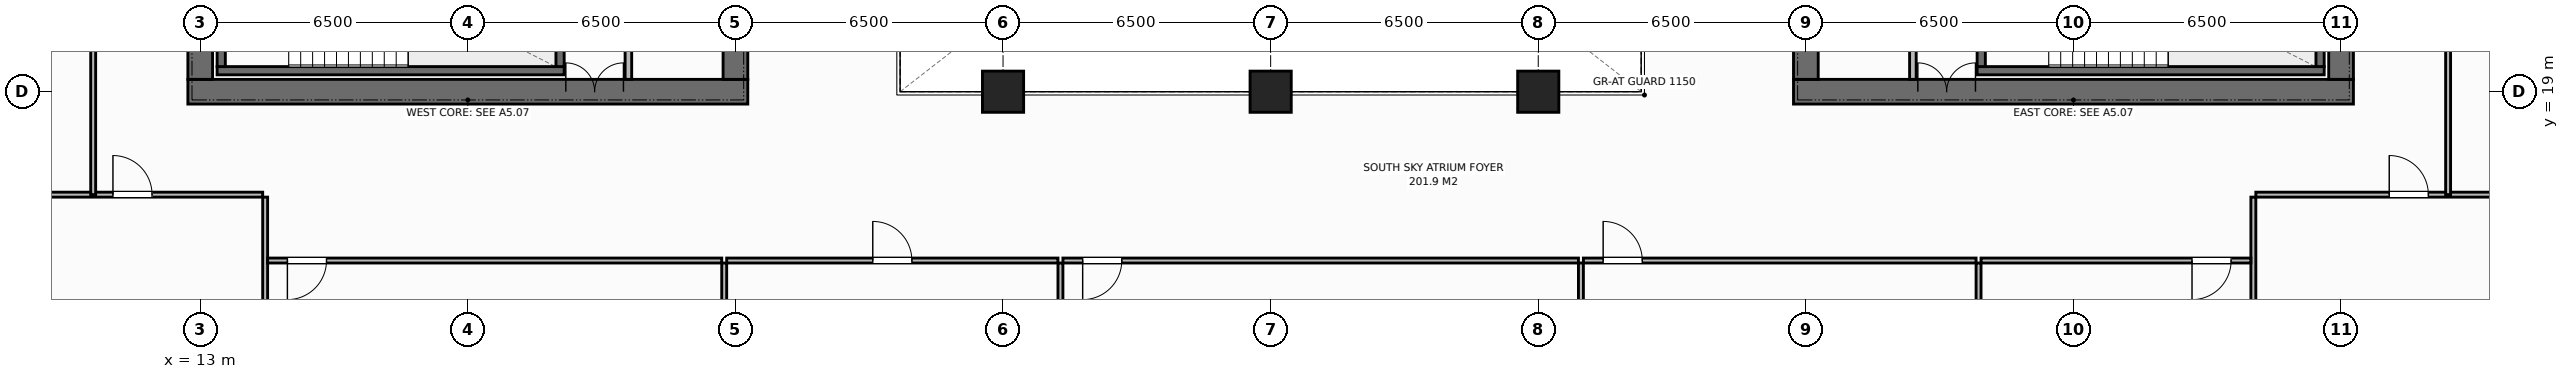
"""IFC4 building model, lengths in metres.
Left out: names, types, materials, properties, quantities, classifications, styles, units other than length and angle.
Written with IfcOpenShell. Run it as: python <this file> out.ifc"""

import sys

from ifc_helpers import new_model, si_unit, direction, frame, frame_2d, origin, origin_2d, place, context, subcontext, project, spatial, rectangle, extrude, element, fill, save


model = new_model("IFC4")
c1 = context("Model", 3, precision=1e-05, world=origin(), true_north=direction((0.0, 1.0)))
c2 = subcontext(c1, "Body", "Model", "MODEL_VIEW")
j1 = project(units=[si_unit("LENGTHUNIT", "METRE"), si_unit("PLANEANGLEUNIT", "RADIAN")], contexts=[c1])
p1 = place(None, origin())
s1 = spatial("IfcSite", under=j1, at=p1, CompositionType="ELEMENT")
p2 = place(p1, origin())
s2 = spatial("IfcBuilding", under=s1, at=p2, CompositionType="ELEMENT")
p3 = place(p2, frame((0.0, 0.0, 186.0)))
s3 = spatial("IfcBuildingStorey", under=s2, at=p3, CompositionType="ELEMENT", Elevation=186.0)
p4 = place(p3, frame((12.7, 19.0, 0.0), z_axis=(0.0, 0.0, 1.0), x_axis=(1.0, 0.0, 0.0)))
e1 = element("IfcWall", 1, at=p4, inside=s3, PredefinedType="SHEAR", context=c2, shape_type="SweptSolid", body=[
    extrude(rectangle(XDim=13.6, YDim=0.6, at=frame_2d((6.8, 0.0))), origin(), (0.0, 0.0, 1.0), 3.8),
])
p5 = place(p4, frame((9.18, 0.0, 0.0)))
e2 = element("IfcOpeningElement", 2, at=p5, cuts=e1, PredefinedType="OPENING", context=c2, shape_type="SweptSolid", body=[
    extrude(rectangle(XDim=1.4, YDim=2.2, at=frame_2d((0.7, 1.1))), frame((0.0, 0.31, 0.0), z_axis=(0.0, -1.0, 0.0), x_axis=(1.0, 0.0, 0.0)), (0.0, 0.0, 1.0), 0.62),
])
p6 = place(p3, frame((13.0, 19.3, 0.0), z_axis=(0.0, 0.0, 1.0), x_axis=(0.0, 1.0, 0.0)))
e3 = element("IfcWall", 3, at=p6, inside=s3, PredefinedType="SHEAR", context=c2, shape_type="SweptSolid", body=[
    extrude(rectangle(XDim=13.4, YDim=0.6, at=frame_2d((6.7, 0.0))), origin(), (0.0, 0.0, 1.0), 3.8),
])
p7 = place(p6, frame((4.75, 0.0, 0.0)))
e4 = element("IfcOpeningElement", 4, at=p7, cuts=e3, PredefinedType="OPENING", context=c2, shape_type="SweptSolid", body=[
    extrude(rectangle(XDim=1.4, YDim=2.2, at=frame_2d((0.7, 1.1))), frame((0.0, 0.31, 0.0), z_axis=(0.0, -1.0, 0.0), x_axis=(1.0, 0.0, 0.0)), (0.0, 0.0, 1.0), 0.62),
])
p8 = place(p3, frame((26.0, 19.3, 0.0), z_axis=(0.0, 0.0, 1.0), x_axis=(0.0, 1.0, 0.0)))
e5 = element("IfcWall", 5, at=p8, inside=s3, PredefinedType="SHEAR", context=c2, shape_type="SweptSolid", body=[
    extrude(rectangle(XDim=13.4, YDim=0.6, at=frame_2d((6.7, 0.0))), origin(), (0.0, 0.0, 1.0), 3.8),
])
p9 = place(p3, frame((51.7, 19.0, 0.0), z_axis=(0.0, 0.0, 1.0), x_axis=(1.0, 0.0, 0.0)))
e6 = element("IfcWall", 6, at=p9, inside=s3, PredefinedType="SHEAR", context=c2, shape_type="SweptSolid", body=[
    extrude(rectangle(XDim=13.6, YDim=0.6, at=frame_2d((6.8, 0.0))), origin(), (0.0, 0.0, 1.0), 3.8),
])
p10 = place(p9, frame((3.02, 0.0, 0.0)))
e7 = element("IfcOpeningElement", 7, at=p10, cuts=e6, PredefinedType="OPENING", context=c2, shape_type="SweptSolid", body=[
    extrude(rectangle(XDim=1.4, YDim=2.2, at=frame_2d((0.7, 1.1))), frame((0.0, 0.31, 0.0), z_axis=(0.0, -1.0, 0.0), x_axis=(1.0, 0.0, 0.0)), (0.0, 0.0, 1.0), 0.62),
])
p11 = place(p3, frame((52.0, 19.3, 0.0), z_axis=(0.0, 0.0, 1.0), x_axis=(0.0, 1.0, 0.0)))
e8 = element("IfcWall", 8, at=p11, inside=s3, PredefinedType="SHEAR", context=c2, shape_type="SweptSolid", body=[
    extrude(rectangle(XDim=13.4, YDim=0.6, at=frame_2d((6.7, 0.0))), origin(), (0.0, 0.0, 1.0), 3.8),
])
p12 = place(p3, frame((65.0, 19.3, 0.0), z_axis=(0.0, 0.0, 1.0), x_axis=(0.0, 1.0, 0.0)))
e9 = element("IfcWall", 9, at=p12, inside=s3, PredefinedType="SHEAR", context=c2, shape_type="SweptSolid", body=[
    extrude(rectangle(XDim=13.4, YDim=0.6, at=frame_2d((6.7, 0.0))), origin(), (0.0, 0.0, 1.0), 3.8),
])
p13 = place(p12, frame((8.15, 0.0, 0.0)))
e10 = element("IfcOpeningElement", 10, at=p13, cuts=e9, PredefinedType="OPENING", context=c2, shape_type="SweptSolid", body=[
    extrude(rectangle(XDim=1.3, YDim=2.2, at=frame_2d((0.65, 1.1))), frame((0.0, 0.31, 0.0), z_axis=(0.0, -1.0, 0.0), x_axis=(1.0, 0.0, 0.0)), (0.0, 0.0, 1.0), 0.62),
])
p14 = place(p3, frame((13.41, 19.51, 0.0), z_axis=(0.0, 0.0, 1.0), x_axis=(1.0, 0.0, 0.0)))
e11 = element("IfcWall", 11, at=p14, inside=s3, PredefinedType="SHEAR", context=c2, shape_type="SweptSolid", body=[
    extrude(rectangle(XDim=8.43, YDim=0.2, at=frame_2d((4.215, 0.0))), origin(), (0.0, 0.0, 1.0), 3.8),
])
for number, where, z_axis, x_axis in (
    (12, (13.51, 19.61, 0.0), (0.0, 0.0, 1.0), (0.0, 1.0, 0.0)),
    (13, (21.74, 19.61, 0.0), (0.0, 0.0, 1.0), (0.0, 1.0, 0.0)),
):
    element("IfcWall", number, at=place(p3, frame(where, z_axis=z_axis, x_axis=x_axis)), inside=s3, PredefinedType="SHEAR", context=c2, shape_type="SweptSolid", body=[
        extrude(rectangle(XDim=3.28, YDim=0.2, at=frame_2d((1.64, 0.0))), origin(), (0.0, 0.0, 1.0), 3.8),
    ])
p15 = place(p3, frame((56.16, 19.51, 0.0), z_axis=(0.0, 0.0, 1.0), x_axis=(1.0, 0.0, 0.0)))
e14 = element("IfcWall", 14, at=p15, inside=s3, PredefinedType="SHEAR", context=c2, shape_type="SweptSolid", body=[
    extrude(rectangle(XDim=8.43, YDim=0.2, at=frame_2d((4.215, 0.0))), origin(), (0.0, 0.0, 1.0), 3.8),
])
for number, where, z_axis, x_axis in (
    (15, (56.26, 19.61, 0.0), (0.0, 0.0, 1.0), (0.0, 1.0, 0.0)),
    (16, (64.49, 19.61, 0.0), (0.0, 0.0, 1.0), (0.0, 1.0, 0.0)),
):
    element("IfcWall", number, at=place(p3, frame(where, z_axis=z_axis, x_axis=x_axis)), inside=s3, PredefinedType="SHEAR", context=c2, shape_type="SweptSolid", body=[
        extrude(rectangle(XDim=3.28, YDim=0.2, at=frame_2d((1.64, 0.0))), origin(), (0.0, 0.0, 1.0), 3.8),
    ])
for number, where, z_axis, x_axis in (
    (17, (32.5, 19.0, 0.0), (0.0, 0.0, 1.0), (1.0, 0.0, 0.0)),
    (18, (39.0, 19.0, 0.0), (0.0, 0.0, 1.0), (1.0, 0.0, 0.0)),
    (19, (45.5, 19.0, 0.0), (0.0, 0.0, 1.0), (1.0, 0.0, 0.0)),
):
    element("IfcColumn", number, at=place(p3, frame(where, z_axis=z_axis, x_axis=x_axis)), inside=s3, PredefinedType="COLUMN", context=c2, shape_type="SweptSolid", body=[
        extrude(rectangle(XDim=1.0, YDim=1.0, at=origin_2d()), origin(), (0.0, 0.0, 1.0), 3.8),
    ])
p16 = place(p3, frame((23.4, 19.3, 0.0), z_axis=(0.0, 0.0, 1.0), x_axis=(0.0, 1.0, 0.0)))
e20 = element("IfcWall", 20, at=p16, inside=s3, PredefinedType="STANDARD", context=c2, shape_type="SweptSolid", body=[
    extrude(rectangle(XDim=13.4, YDim=0.16, at=frame_2d((6.7, 0.0))), origin(), (0.0, 0.0, 1.0), 3.572),
])
p17 = place(p16, frame((2.2, 0.0, 0.0)))
e21 = element("IfcOpeningElement", 21, at=p17, cuts=e20, PredefinedType="OPENING", context=c2, shape_type="SweptSolid", body=[
    extrude(rectangle(XDim=0.95, YDim=2.15, at=frame_2d((0.475, 1.075))), frame((0.0, 0.09, 0.0), z_axis=(0.0, -1.0, 0.0), x_axis=(1.0, 0.0, 0.0)), (0.0, 0.0, 1.0), 0.18),
])
p18 = place(p16, frame((6.3, 0.0, 0.0)))
e22 = element("IfcOpeningElement", 22, at=p18, cuts=e20, PredefinedType="OPENING", context=c2, shape_type="SweptSolid", body=[
    extrude(rectangle(XDim=0.95, YDim=2.15, at=frame_2d((0.475, 1.075))), frame((0.0, 0.09, 0.0), z_axis=(0.0, -1.0, 0.0), x_axis=(1.0, 0.0, 0.0)), (0.0, 0.0, 1.0), 0.18),
])
p19 = place(p16, frame((9.3, 0.0, 0.0)))
e23 = element("IfcOpeningElement", 23, at=p19, cuts=e20, PredefinedType="OPENING", context=c2, shape_type="SweptSolid", body=[
    extrude(rectangle(XDim=1.1, YDim=2.2, at=frame_2d((0.55, 1.1))), frame((0.0, 0.09, 0.0), z_axis=(0.0, -1.0, 0.0), x_axis=(1.0, 0.0, 0.0)), (0.0, 0.0, 1.0), 0.18),
])
p20 = place(p16, frame((11.5, 0.0, 0.0)))
e24 = element("IfcOpeningElement", 24, at=p20, cuts=e20, PredefinedType="OPENING", context=c2, shape_type="SweptSolid", body=[
    extrude(rectangle(XDim=1.1, YDim=2.2, at=frame_2d((0.55, 1.1))), frame((0.0, 0.09, 0.0), z_axis=(0.0, -1.0, 0.0), x_axis=(1.0, 0.0, 0.0)), (0.0, 0.0, 1.0), 0.18),
])
p21 = place(p3, frame((54.6, 19.3, 0.0), z_axis=(0.0, 0.0, 1.0), x_axis=(0.0, 1.0, 0.0)))
e25 = element("IfcWall", 25, at=p21, inside=s3, PredefinedType="STANDARD", context=c2, shape_type="SweptSolid", body=[
    extrude(rectangle(XDim=13.4, YDim=0.16, at=frame_2d((6.7, 0.0))), origin(), (0.0, 0.0, 1.0), 3.572),
])
p22 = place(p21, frame((2.1, 0.0, 0.0)))
e26 = element("IfcOpeningElement", 26, at=p22, cuts=e25, PredefinedType="OPENING", context=c2, shape_type="SweptSolid", body=[
    extrude(rectangle(XDim=0.95, YDim=2.15, at=frame_2d((0.475, 1.075))), frame((0.0, 0.09, 0.0), z_axis=(0.0, -1.0, 0.0), x_axis=(1.0, 0.0, 0.0)), (0.0, 0.0, 1.0), 0.18),
])
p23 = place(p21, frame((6.2, 0.0, 0.0)))
e27 = element("IfcOpeningElement", 27, at=p23, cuts=e25, PredefinedType="OPENING", context=c2, shape_type="SweptSolid", body=[
    extrude(rectangle(XDim=0.95, YDim=2.15, at=frame_2d((0.475, 1.075))), frame((0.0, 0.09, 0.0), z_axis=(0.0, -1.0, 0.0), x_axis=(1.0, 0.0, 0.0)), (0.0, 0.0, 1.0), 0.18),
])
p24 = place(p21, frame((9.3, 0.0, 0.0)))
e28 = element("IfcOpeningElement", 28, at=p24, cuts=e25, PredefinedType="OPENING", context=c2, shape_type="SweptSolid", body=[
    extrude(rectangle(XDim=1.1, YDim=2.2, at=frame_2d((0.55, 1.1))), frame((0.0, 0.09, 0.0), z_axis=(0.0, -1.0, 0.0), x_axis=(1.0, 0.0, 0.0)), (0.0, 0.0, 1.0), 0.18),
])
p25 = place(p21, frame((11.5, 0.0, 0.0)))
e29 = element("IfcOpeningElement", 29, at=p25, cuts=e25, PredefinedType="OPENING", context=c2, shape_type="SweptSolid", body=[
    extrude(rectangle(XDim=1.1, YDim=2.2, at=frame_2d((0.55, 1.1))), frame((0.0, 0.09, 0.0), z_axis=(0.0, -1.0, 0.0), x_axis=(1.0, 0.0, 0.0)), (0.0, 0.0, 1.0), 0.18),
])
p26 = place(p3, frame((14.577, 3.42, 0.0), z_axis=(0.0, 0.0, 1.0), x_axis=(0.0, 1.0, 0.0)))
e30 = element("IfcWall", 30, at=p26, inside=s3, PredefinedType="PARTITIONING", context=c2, shape_type="SweptSolid", body=[
    extrude(rectangle(XDim=13.02, YDim=0.12, at=frame_2d((6.51, 0.0))), origin(), (0.0, 0.0, 1.0), 3.572),
])
p27 = place(p3, frame((3.98, 16.5, 0.0), z_axis=(0.0, 0.0, 1.0), x_axis=(1.0, 0.0, 0.0)))
e31 = element("IfcWall", 31, at=p27, inside=s3, PredefinedType="PARTITIONING", context=c2, shape_type="SweptSolid", body=[
    extrude(rectangle(XDim=10.537, YDim=0.12, at=frame_2d((5.269, 0.0))), origin(), (0.0, 0.0, 1.0), 3.572),
])
p28 = place(p27, frame((6.9, 0.0, 0.0)))
e32 = element("IfcOpeningElement", 32, at=p28, cuts=e31, PredefinedType="OPENING", context=c2, shape_type="SweptSolid", body=[
    extrude(rectangle(XDim=0.95, YDim=2.15, at=frame_2d((0.475, 1.075))), frame((0.0, 0.07, 0.0), z_axis=(0.0, -1.0, 0.0), x_axis=(1.0, 0.0, 0.0)), (0.0, 0.0, 1.0), 0.14),
])
p29 = place(p3, frame((25.727, 3.42, 0.0), z_axis=(0.0, 0.0, 1.0), x_axis=(0.0, 1.0, 0.0)))
e33 = element("IfcWall", 33, at=p29, inside=s3, PredefinedType="PARTITIONING", context=c2, shape_type="SweptSolid", body=[
    extrude(rectangle(XDim=11.42, YDim=0.12, at=frame_2d((5.71, 0.0))), origin(), (0.0, 0.0, 1.0), 3.572),
])
p30 = place(p3, frame((14.637, 14.9, 0.0), z_axis=(0.0, 0.0, 1.0), x_axis=(1.0, 0.0, 0.0)))
e34 = element("IfcWall", 34, at=p30, inside=s3, PredefinedType="PARTITIONING", context=c2, shape_type="SweptSolid", body=[
    extrude(rectangle(XDim=11.03, YDim=0.12, at=frame_2d((5.515, 0.0))), origin(), (0.0, 0.0, 1.0), 3.572),
])
p31 = place(p30, frame((0.48, 0.0, 0.0)))
e35 = element("IfcOpeningElement", 35, at=p31, cuts=e34, PredefinedType="OPENING", context=c2, shape_type="SweptSolid", body=[
    extrude(rectangle(XDim=0.95, YDim=2.15, at=frame_2d((0.475, 1.075))), frame((0.0, 0.07, 0.0), z_axis=(0.0, -1.0, 0.0), x_axis=(1.0, 0.0, 0.0)), (0.0, 0.0, 1.0), 0.14),
])
p32 = place(p3, frame((33.894, 3.42, 0.0), z_axis=(0.0, 0.0, 1.0), x_axis=(0.0, 1.0, 0.0)))
e36 = element("IfcWall", 36, at=p32, inside=s3, PredefinedType="PARTITIONING", context=c2, shape_type="SweptSolid", body=[
    extrude(rectangle(XDim=11.42, YDim=0.12, at=frame_2d((5.71, 0.0))), origin(), (0.0, 0.0, 1.0), 3.572),
])
p33 = place(p3, frame((25.787, 14.9, 0.0), z_axis=(0.0, 0.0, 1.0), x_axis=(1.0, 0.0, 0.0)))
e37 = element("IfcWall", 37, at=p33, inside=s3, PredefinedType="PARTITIONING", context=c2, shape_type="SweptSolid", body=[
    extrude(rectangle(XDim=8.047, YDim=0.12, at=frame_2d((4.023, 0.0))), origin(), (0.0, 0.0, 1.0), 3.572),
])
p34 = place(p33, frame((3.548, 0.0, 0.0)))
e38 = element("IfcOpeningElement", 38, at=p34, cuts=e37, PredefinedType="OPENING", context=c2, shape_type="SweptSolid", body=[
    extrude(rectangle(XDim=0.95, YDim=2.15, at=frame_2d((0.475, 1.075))), frame((0.0, 0.07, 0.0), z_axis=(0.0, -1.0, 0.0), x_axis=(1.0, 0.0, 0.0)), (0.0, 0.0, 1.0), 0.14),
])
p35 = place(p3, frame((46.536, 3.42, 0.0), z_axis=(0.0, 0.0, 1.0), x_axis=(0.0, 1.0, 0.0)))
e39 = element("IfcWall", 39, at=p35, inside=s3, PredefinedType="PARTITIONING", context=c2, shape_type="SweptSolid", body=[
    extrude(rectangle(XDim=11.42, YDim=0.12, at=frame_2d((5.71, 0.0))), origin(), (0.0, 0.0, 1.0), 3.572),
])
p36 = place(p3, frame((33.954, 14.9, 0.0), z_axis=(0.0, 0.0, 1.0), x_axis=(1.0, 0.0, 0.0)))
e40 = element("IfcWall", 40, at=p36, inside=s3, PredefinedType="PARTITIONING", context=c2, shape_type="SweptSolid", body=[
    extrude(rectangle(XDim=12.522, YDim=0.12, at=frame_2d((6.261, 0.0))), origin(), (0.0, 0.0, 1.0), 3.572),
])
p37 = place(p36, frame((0.48, 0.0, 0.0)))
e41 = element("IfcOpeningElement", 41, at=p37, cuts=e40, PredefinedType="OPENING", context=c2, shape_type="SweptSolid", body=[
    extrude(rectangle(XDim=0.95, YDim=2.15, at=frame_2d((0.475, 1.075))), frame((0.0, 0.07, 0.0), z_axis=(0.0, -1.0, 0.0), x_axis=(1.0, 0.0, 0.0)), (0.0, 0.0, 1.0), 0.14),
])
p38 = place(p3, frame((56.195, 3.42, 0.0), z_axis=(0.0, 0.0, 1.0), x_axis=(0.0, 1.0, 0.0)))
e42 = element("IfcWall", 42, at=p38, inside=s3, PredefinedType="PARTITIONING", context=c2, shape_type="SweptSolid", body=[
    extrude(rectangle(XDim=11.42, YDim=0.12, at=frame_2d((5.71, 0.0))), origin(), (0.0, 0.0, 1.0), 3.572),
])
p39 = place(p3, frame((46.596, 14.9, 0.0), z_axis=(0.0, 0.0, 1.0), x_axis=(1.0, 0.0, 0.0)))
e43 = element("IfcWall", 43, at=p39, inside=s3, PredefinedType="PARTITIONING", context=c2, shape_type="SweptSolid", body=[
    extrude(rectangle(XDim=9.539, YDim=0.12, at=frame_2d((4.769, 0.0))), origin(), (0.0, 0.0, 1.0), 3.572),
])
p40 = place(p39, frame((0.48, 0.0, 0.0)))
e44 = element("IfcOpeningElement", 44, at=p40, cuts=e43, PredefinedType="OPENING", context=c2, shape_type="SweptSolid", body=[
    extrude(rectangle(XDim=0.95, YDim=2.15, at=frame_2d((0.475, 1.075))), frame((0.0, 0.07, 0.0), z_axis=(0.0, -1.0, 0.0), x_axis=(1.0, 0.0, 0.0)), (0.0, 0.0, 1.0), 0.14),
])
p41 = place(p3, frame((62.87, 3.42, 0.0), z_axis=(0.0, 0.0, 1.0), x_axis=(0.0, 1.0, 0.0)))
e45 = element("IfcWall", 45, at=p41, inside=s3, PredefinedType="PARTITIONING", context=c2, shape_type="SweptSolid", body=[
    extrude(rectangle(XDim=13.02, YDim=0.12, at=frame_2d((6.51, 0.0))), origin(), (0.0, 0.0, 1.0), 3.572),
])
p42 = place(p3, frame((56.255, 14.9, 0.0), z_axis=(0.0, 0.0, 1.0), x_axis=(1.0, 0.0, 0.0)))
e46 = element("IfcWall", 46, at=p42, inside=s3, PredefinedType="PARTITIONING", context=c2, shape_type="SweptSolid", body=[
    extrude(rectangle(XDim=6.555, YDim=0.12, at=frame_2d((3.277, 0.0))), origin(), (0.0, 0.0, 1.0), 3.572),
])
p43 = place(p42, frame((5.125, 0.0, 0.0)))
e47 = element("IfcOpeningElement", 47, at=p43, cuts=e46, PredefinedType="OPENING", context=c2, shape_type="SweptSolid", body=[
    extrude(rectangle(XDim=0.95, YDim=2.15, at=frame_2d((0.475, 1.075))), frame((0.0, 0.07, 0.0), z_axis=(0.0, -1.0, 0.0), x_axis=(1.0, 0.0, 0.0)), (0.0, 0.0, 1.0), 0.14),
])
p44 = place(p3, frame((62.93, 16.5, 0.0), z_axis=(0.0, 0.0, 1.0), x_axis=(1.0, 0.0, 0.0)))
e48 = element("IfcWall", 48, at=p44, inside=s3, PredefinedType="PARTITIONING", context=c2, shape_type="SweptSolid", body=[
    extrude(rectangle(XDim=11.09, YDim=0.12, at=frame_2d((5.545, 0.0))), origin(), (0.0, 0.0, 1.0), 3.572),
])
p45 = place(p44, frame((3.24, 0.0, 0.0)))
e49 = element("IfcOpeningElement", 49, at=p45, cuts=e48, PredefinedType="OPENING", context=c2, shape_type="SweptSolid", body=[
    extrude(rectangle(XDim=0.95, YDim=2.15, at=frame_2d((0.475, 1.075))), frame((0.0, 0.07, 0.0), z_axis=(0.0, -1.0, 0.0), x_axis=(1.0, 0.0, 0.0)), (0.0, 0.0, 1.0), 0.14),
])
p46 = place(p3, frame((10.4, 16.5, 0.0), z_axis=(0.0, 0.0, 1.0), x_axis=(0.0, 1.0, 0.0)))
e50 = element("IfcWall", 50, at=p46, inside=s3, PredefinedType="PARTITIONING", context=c2, shape_type="SweptSolid", body=[
    extrude(rectangle(XDim=6.333, YDim=0.12, at=frame_2d((3.167, 0.0))), origin(), (0.0, 0.0, 1.0), 3.572),
])
p47 = place(p46, frame((3.742, 0.0, 0.0)))
e51 = element("IfcOpeningElement", 51, at=p47, cuts=e50, PredefinedType="OPENING", context=c2, shape_type="SweptSolid", body=[
    extrude(rectangle(XDim=0.95, YDim=2.15, at=frame_2d((0.475, 1.075))), frame((0.0, 0.07, 0.0), z_axis=(0.0, -1.0, 0.0), x_axis=(1.0, 0.0, 0.0)), (0.0, 0.0, 1.0), 0.14),
])
p48 = place(p3, frame((67.6, 16.5, 0.0), z_axis=(0.0, 0.0, 1.0), x_axis=(0.0, 1.0, 0.0)))
e52 = element("IfcWall", 52, at=p48, inside=s3, PredefinedType="PARTITIONING", context=c2, shape_type="SweptSolid", body=[
    extrude(rectangle(XDim=16.9, YDim=0.12, at=frame_2d((8.45, 0.0))), origin(), (0.0, 0.0, 1.0), 3.572),
])
p49 = place(p48, frame((9.025, 0.0, 0.0)))
e53 = element("IfcOpeningElement", 53, at=p49, cuts=e52, PredefinedType="OPENING", context=c2, shape_type="SweptSolid", body=[
    extrude(rectangle(XDim=0.95, YDim=2.15, at=frame_2d((0.475, 1.075))), frame((0.0, 0.07, 0.0), z_axis=(0.0, -1.0, 0.0), x_axis=(1.0, 0.0, 0.0)), (0.0, 0.0, 1.0), 0.14),
])
p50 = place(p5, origin())
e54 = element("IfcDoor", 54, at=p50, inside=s3, OperationType="DOUBLE_DOOR_SINGLE_SWING", PredefinedType="DOOR", context=c2, shape_type="SweptSolid", body=[
    extrude(rectangle(XDim=1.4, YDim=2.2, at=frame_2d((0.7, 1.1))), frame((0.0, 0.075, 0.0), z_axis=(0.0, -1.0, 0.0), x_axis=(1.0, 0.0, 0.0)), (0.0, 0.0, 1.0), 0.05),
])
fill(e2, e54)
p51 = place(p10, origin())
e55 = element("IfcDoor", 55, at=p51, inside=s3, OperationType="DOUBLE_DOOR_SINGLE_SWING", PredefinedType="DOOR", context=c2, shape_type="SweptSolid", body=[
    extrude(rectangle(XDim=1.4, YDim=2.2, at=frame_2d((0.7, 1.1))), frame((0.0, 0.075, 0.0), z_axis=(0.0, -1.0, 0.0), x_axis=(1.0, 0.0, 0.0)), (0.0, 0.0, 1.0), 0.05),
])
fill(e7, e55)
p52 = place(p28, origin())
e56 = element("IfcDoor", 56, at=p52, inside=s3, OperationType="SINGLE_SWING_LEFT", PredefinedType="DOOR", context=c2, shape_type="SweptSolid", body=[
    extrude(rectangle(XDim=0.95, YDim=2.15, at=frame_2d((0.475, 1.075))), frame((0.0, 0.025, 0.0), z_axis=(0.0, -1.0, 0.0), x_axis=(1.0, 0.0, 0.0)), (0.0, 0.0, 1.0), 0.05),
])
fill(e32, e56)
p53 = place(p31, origin())
e57 = element("IfcDoor", 57, at=p53, inside=s3, OperationType="SINGLE_SWING_RIGHT", PredefinedType="DOOR", context=c2, shape_type="SweptSolid", body=[
    extrude(rectangle(XDim=0.95, YDim=2.15, at=frame_2d((0.475, 1.075))), frame((0.0, 0.025, 0.0), z_axis=(0.0, -1.0, 0.0), x_axis=(1.0, 0.0, 0.0)), (0.0, 0.0, 1.0), 0.05),
])
fill(e35, e57)
p54 = place(p34, origin())
e58 = element("IfcDoor", 58, at=p54, inside=s3, OperationType="SINGLE_SWING_LEFT", PredefinedType="DOOR", context=c2, shape_type="SweptSolid", body=[
    extrude(rectangle(XDim=0.95, YDim=2.15, at=frame_2d((0.475, 1.075))), frame((0.0, 0.025, 0.0), z_axis=(0.0, -1.0, 0.0), x_axis=(1.0, 0.0, 0.0)), (0.0, 0.0, 1.0), 0.05),
])
fill(e38, e58)
p55 = place(p37, origin())
e59 = element("IfcDoor", 59, at=p55, inside=s3, OperationType="SINGLE_SWING_RIGHT", PredefinedType="DOOR", context=c2, shape_type="SweptSolid", body=[
    extrude(rectangle(XDim=0.95, YDim=2.15, at=frame_2d((0.475, 1.075))), frame((0.0, 0.025, 0.0), z_axis=(0.0, -1.0, 0.0), x_axis=(1.0, 0.0, 0.0)), (0.0, 0.0, 1.0), 0.05),
])
fill(e41, e59)
p56 = place(p40, origin())
e60 = element("IfcDoor", 60, at=p56, inside=s3, OperationType="SINGLE_SWING_LEFT", PredefinedType="DOOR", context=c2, shape_type="SweptSolid", body=[
    extrude(rectangle(XDim=0.95, YDim=2.15, at=frame_2d((0.475, 1.075))), frame((0.0, 0.025, 0.0), z_axis=(0.0, -1.0, 0.0), x_axis=(1.0, 0.0, 0.0)), (0.0, 0.0, 1.0), 0.05),
])
fill(e44, e60)
p57 = place(p43, origin())
e61 = element("IfcDoor", 61, at=p57, inside=s3, OperationType="SINGLE_SWING_RIGHT", PredefinedType="DOOR", context=c2, shape_type="SweptSolid", body=[
    extrude(rectangle(XDim=0.95, YDim=2.15, at=frame_2d((0.475, 1.075))), frame((0.0, 0.025, 0.0), z_axis=(0.0, -1.0, 0.0), x_axis=(1.0, 0.0, 0.0)), (0.0, 0.0, 1.0), 0.05),
])
fill(e47, e61)
p58 = place(p45, origin())
e62 = element("IfcDoor", 62, at=p58, inside=s3, OperationType="SINGLE_SWING_LEFT", PredefinedType="DOOR", context=c2, shape_type="SweptSolid", body=[
    extrude(rectangle(XDim=0.95, YDim=2.15, at=frame_2d((0.475, 1.075))), frame((0.0, 0.025, 0.0), z_axis=(0.0, -1.0, 0.0), x_axis=(1.0, 0.0, 0.0)), (0.0, 0.0, 1.0), 0.05),
])
fill(e49, e62)
save(model, sys.argv[1])
